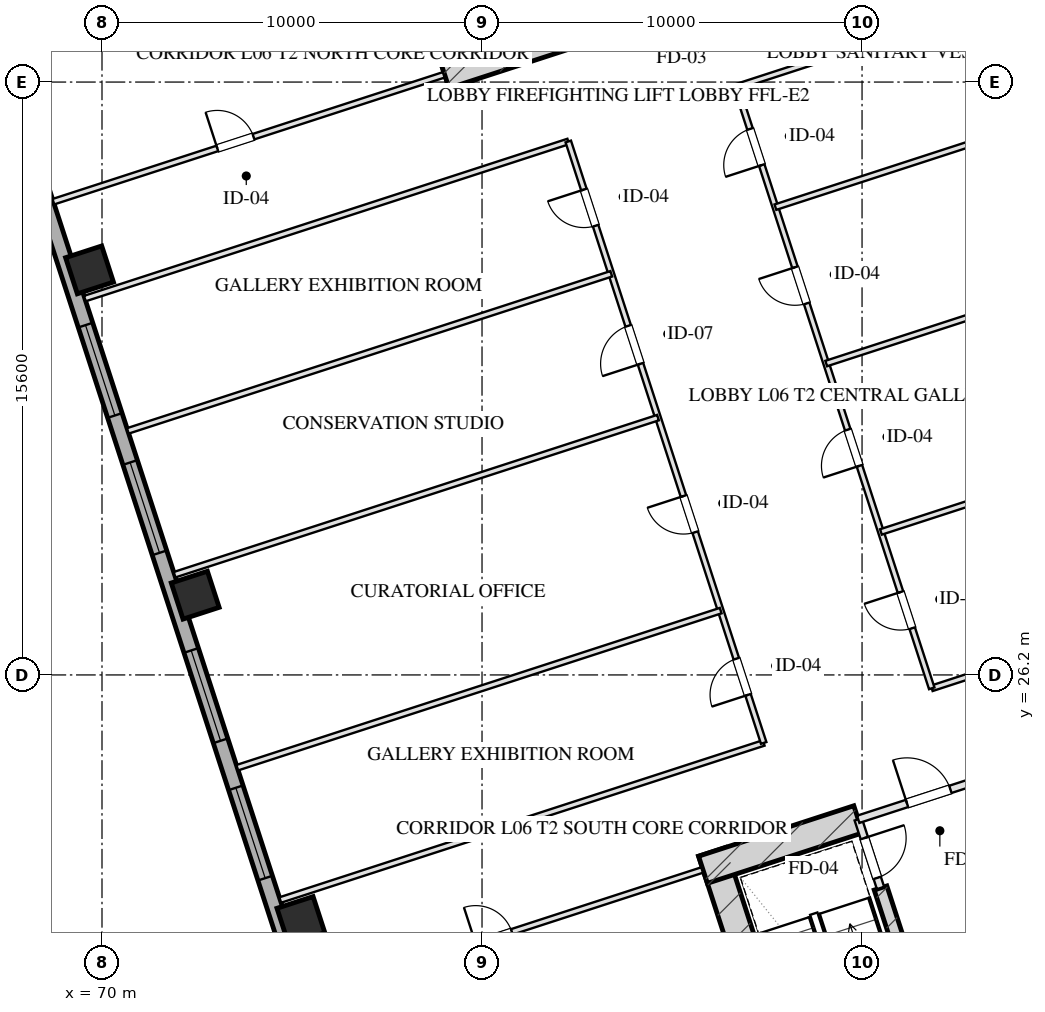
"""IFC4 building model, lengths in metres.
Left out: names, types, materials, properties, quantities, classifications, styles, units other than length and angle.
Written with IfcOpenShell. Run it as: python <this file> out.ifc"""

import sys

from ifc_helpers import new_model, si_unit, direction, frame, frame_2d, origin, origin_2d, place, context, subcontext, project, spatial, rectangle, hollow_rectangle, extrude, element, fill, save


model = new_model("IFC4")
c1 = context("Model", 3, precision=1e-05, world=origin(), true_north=direction((0.0, 1.0)))
c2 = subcontext(c1, "Body", "Model", "MODEL_VIEW")
j1 = project(units=[si_unit("LENGTHUNIT", "METRE"), si_unit("PLANEANGLEUNIT", "RADIAN")], contexts=[c1])
p1 = place(None, origin())
s1 = spatial("IfcSite", under=j1, at=p1, CompositionType="ELEMENT")
p2 = place(p1, origin())
s2 = spatial("IfcBuilding", under=s1, at=p2, CompositionType="ELEMENT")
p3 = place(p2, frame((0.0, 0.0, 30.0)))
s3 = spatial("IfcBuildingStorey", under=s2, at=p3, CompositionType="ELEMENT", Elevation=30.0)
p4 = place(p3, frame((86.055, 21.546, 0.0), z_axis=(0.0, 0.0, 1.0), x_axis=(0.309023585745, -0.951054374604, 0.0)))
e1 = element("IfcWall", 1, at=p4, inside=s3, PredefinedType="SHEAR", context=c2, shape_type="SweptSolid", body=[
    extrude(rectangle(XDim=9.63, YDim=0.75, at=frame_2d((4.815, 0.0))), origin(), (0.0, 0.0, 1.0), 4.0),
])
p5 = place(p3, frame((90.486, 20.594, 0.0), z_axis=(0.0, 0.0, 1.0), x_axis=(0.309020428229, -0.951055400562, 0.0)))
e2 = element("IfcWall", 2, at=p5, inside=s3, PredefinedType="SHEAR", context=c2, shape_type="SweptSolid", body=[
    extrude(rectangle(XDim=6.98, YDim=0.35, at=frame_2d((3.49, 0.0))), origin(), (0.0, 0.0, 1.0), 4.0),
])
p6 = place(p3, frame((85.814, 21.074, 0.0), z_axis=(0.0, 0.0, 1.0), x_axis=(0.95106580992, 0.308988390074, 0.0)))
e3 = element("IfcWall", 3, at=p6, inside=s3, PredefinedType="SHEAR", context=c2, shape_type="SweptSolid", body=[
    extrude(rectangle(XDim=4.295, YDim=0.75, at=frame_2d((2.147, 0.0))), origin(), (0.0, 0.0, 1.0), 4.0),
])
p7 = place(p3, frame((79.489, 41.756, 0.0), z_axis=(0.0, 0.0, 1.0), x_axis=(-0.309016134813, 0.951056795583, 0.0)))
e4 = element("IfcWall", 4, at=p7, inside=s3, PredefinedType="SHEAR", context=c2, shape_type="SweptSolid", body=[
    extrude(rectangle(XDim=9.63, YDim=0.75, at=frame_2d((4.815, 0.0))), origin(), (0.0, 0.0, 1.0), 4.0),
])
p8 = place(p3, frame((79.016, 41.997, 0.0), z_axis=(0.0, 0.0, 1.0), x_axis=(0.95106038264, 0.309005094736, 0.0)))
e5 = element("IfcWall", 5, at=p8, inside=s3, PredefinedType="SHEAR", context=c2, shape_type="SweptSolid", body=[
    extrude(rectangle(XDim=4.295, YDim=0.75, at=frame_2d((2.147, 0.0))), origin(), (0.0, 0.0, 1.0), 4.0),
])
for number, where, z_axis, x_axis in (
    (6, (75.234, 19.739, 0.0), (0.0, 0.0, 1.0), (0.951, 0.309, 0.0)),
    (7, (72.453, 28.299, 0.0), (0.0, 0.0, 1.0), (0.951, 0.309, 0.0)),
    (8, (69.672, 36.858, 0.0), (0.0, 0.0, 1.0), (0.951, 0.309, 0.0)),
):
    element("IfcColumn", number, at=place(p3, frame(where, z_axis=z_axis, x_axis=x_axis)), inside=s3, PredefinedType="COLUMN", context=c2, shape_type="SweptSolid", body=[
        extrude(hollow_rectangle(XDim=1.0, YDim=1.0, WallThickness=0.036, at=origin_2d()), origin(), (0.0, 0.0, 1.0), 4.001),
    ])
p9 = place(p3, frame((79.655, 4.352, 0.0), z_axis=(0.0, 0.0, 1.0), x_axis=(-0.309014526607, 0.951057318118, 0.0)))
e9 = element("IfcWall", 9, at=p9, inside=s3, PredefinedType="SOLIDWALL", context=c2, shape_type="SweptSolid", body=[
    extrude(rectangle(XDim=50.0, YDim=0.4, at=frame_2d((25.0, 0.0))), origin(), (0.0, 0.0, 1.0), 3.16),
])
p10 = place(p9, frame((17.35, 0.0, 0.75)))
e10 = element("IfcOpeningElement", 10, at=p10, cuts=e9, PredefinedType="OPENING", context=c2, shape_type="SweptSolid", body=[
    extrude(rectangle(XDim=2.5, YDim=1.75, at=frame_2d((1.25, 0.875))), frame((0.0, 0.21, 0.0), z_axis=(0.0, -1.0, 0.0), x_axis=(1.0, 0.0, 0.0)), (0.0, 0.0, 1.0), 0.42),
])
p11 = place(p9, frame((21.15, 0.0, 0.75)))
e11 = element("IfcOpeningElement", 11, at=p11, cuts=e9, PredefinedType="OPENING", context=c2, shape_type="SweptSolid", body=[
    extrude(rectangle(XDim=2.5, YDim=1.75, at=frame_2d((1.25, 0.875))), frame((0.0, 0.21, 0.0), z_axis=(0.0, -1.0, 0.0), x_axis=(1.0, 0.0, 0.0)), (0.0, 0.0, 1.0), 0.42),
])
p12 = place(p9, frame((26.35, 0.0, 0.75)))
e12 = element("IfcOpeningElement", 12, at=p12, cuts=e9, PredefinedType="OPENING", context=c2, shape_type="SweptSolid", body=[
    extrude(rectangle(XDim=2.5, YDim=1.75, at=frame_2d((1.25, 0.875))), frame((0.0, 0.21, 0.0), z_axis=(0.0, -1.0, 0.0), x_axis=(1.0, 0.0, 0.0)), (0.0, 0.0, 1.0), 0.42),
])
p13 = place(p9, frame((30.15, 0.0, 0.75)))
e13 = element("IfcOpeningElement", 13, at=p13, cuts=e9, PredefinedType="OPENING", context=c2, shape_type="SweptSolid", body=[
    extrude(rectangle(XDim=2.5, YDim=1.75, at=frame_2d((1.25, 0.875))), frame((0.0, 0.21, 0.0), z_axis=(0.0, -1.0, 0.0), x_axis=(1.0, 0.0, 0.0)), (0.0, 0.0, 1.0), 0.42),
])
p14 = place(p3, frame((89.899, 22.401, 0.0), z_axis=(0.0, 0.0, 1.0), x_axis=(0.308932062672, -0.951084108086, 0.0)))
e14 = element("IfcWall", 14, at=p14, inside=s3, PredefinedType="PARTITIONING", context=c2, shape_type="SweptSolid", body=[
    extrude(rectangle(XDim=1.9, YDim=0.2, at=frame_2d((0.95, 0.0))), origin(), (0.0, 0.0, 1.0), 3.725),
])
p15 = place(p14, frame((0.52, 0.0, 0.0)))
e15 = element("IfcOpeningElement", 15, at=p15, cuts=e14, PredefinedType="OPENING", context=c2, shape_type="SweptSolid", body=[
    extrude(rectangle(XDim=1.1, YDim=2.05, at=frame_2d((0.55, 1.025))), frame((0.0, 0.11, 0.0), z_axis=(0.0, -1.0, 0.0), x_axis=(1.0, 0.0, 0.0)), (0.0, 0.0, 1.0), 0.22),
])
p16 = place(p3, frame((89.899, 22.401, 0.0), z_axis=(0.0, 0.0, 1.0), x_axis=(0.951046716504, 0.309047153403, 0.0)))
e16 = element("IfcWall", 16, at=p16, inside=s3, PredefinedType="PARTITIONING", context=c2, shape_type="SweptSolid", body=[
    extrude(rectangle(XDim=3.83, YDim=0.2, at=frame_2d((1.915, 0.0))), origin(), (0.0, 0.0, 1.0), 3.725),
])
p17 = place(p16, frame((1.35, 0.0, 0.0)))
e17 = element("IfcOpeningElement", 17, at=p17, cuts=e16, PredefinedType="OPENING", context=c2, shape_type="SweptSolid", body=[
    extrude(rectangle(XDim=1.2, YDim=2.05, at=frame_2d((0.6, 1.025))), frame((0.0, 0.11, 0.0), z_axis=(0.0, -1.0, 0.0), x_axis=(1.0, 0.0, 0.0)), (0.0, 0.0, 1.0), 0.22),
])
p18 = place(p3, frame((75.519, 17.729, 0.0), z_axis=(0.0, 0.0, 1.0), x_axis=(0.951056658866, 0.309016555588, 0.0)))
e18 = element("IfcWall", 18, at=p18, inside=s3, PredefinedType="PARTITIONING", context=c2, shape_type="SweptSolid", body=[
    extrude(rectangle(XDim=10.8, YDim=0.15, at=frame_2d((5.4, 0.0))), origin(), (0.0, 0.0, 1.0), 3.725),
])
p19 = place(p18, frame((4.536, 0.0, 0.0)))
e19 = element("IfcOpeningElement", 19, at=p19, cuts=e18, PredefinedType="OPENING", context=c2, shape_type="SweptSolid", body=[
    extrude(rectangle(XDim=1.0, YDim=2.05, at=frame_2d((0.5, 1.025))), frame((0.0, 0.085, 0.0), z_axis=(0.0, -1.0, 0.0), x_axis=(1.0, 0.0, 0.0)), (0.0, 0.0, 1.0), 0.17),
])
p20 = place(p3, frame((68.721, 38.652, 0.0), z_axis=(0.0, 0.0, 1.0), x_axis=(0.951056658866, 0.309016555588, 0.0)))
e20 = element("IfcWall", 20, at=p20, inside=s3, PredefinedType="PARTITIONING", context=c2, shape_type="SweptSolid", body=[
    extrude(rectangle(XDim=10.8, YDim=0.15, at=frame_2d((5.4, 0.0))), origin(), (0.0, 0.0, 1.0), 3.725),
])
p21 = place(p20, frame((4.536, 0.0, 0.0)))
e21 = element("IfcOpeningElement", 21, at=p21, cuts=e20, PredefinedType="OPENING", context=c2, shape_type="SweptSolid", body=[
    extrude(rectangle(XDim=1.0, YDim=2.05, at=frame_2d((0.5, 1.025))), frame((0.0, 0.085, 0.0), z_axis=(0.0, -1.0, 0.0), x_axis=(1.0, 0.0, 0.0)), (0.0, 0.0, 1.0), 0.17),
])
p22 = place(p3, frame((74.691, 20.278, 0.0), z_axis=(0.0, 0.0, 1.0), x_axis=(0.951052712421, 0.309028701251, 0.0)))
e22 = element("IfcWall", 22, at=p22, inside=s3, PredefinedType="PARTITIONING", context=c2, shape_type="SweptSolid", body=[
    extrude(rectangle(XDim=13.375, YDim=0.15, at=frame_2d((6.688, 0.0))), origin(), (0.0, 0.0, 1.0), 3.725),
])
p23 = place(p3, frame((91.834, 25.848, 0.0), z_axis=(0.0, 0.0, 1.0), x_axis=(0.951055605195, 0.309019798438, 0.0)))
e23 = element("IfcWall", 23, at=p23, inside=s3, PredefinedType="PARTITIONING", context=c2, shape_type="SweptSolid", body=[
    extrude(rectangle(XDim=19.575, YDim=0.15, at=frame_2d((9.788, 0.0))), origin(), (0.0, 0.0, 1.0), 3.725),
])
p24 = place(p3, frame((69.549, 36.103, 0.0), z_axis=(0.0, 0.0, 1.0), x_axis=(0.951058077006, 0.309012190961, 0.0)))
e24 = element("IfcWall", 24, at=p24, inside=s3, PredefinedType="PARTITIONING", context=c2, shape_type="SweptSolid", body=[
    extrude(rectangle(XDim=13.375, YDim=0.15, at=frame_2d((6.688, 0.0))), origin(), (0.0, 0.0, 1.0), 3.725),
])
p25 = place(p3, frame((86.692, 41.673, 0.0), z_axis=(0.0, 0.0, 1.0), x_axis=(0.951055605195, 0.309019798438, 0.0)))
e25 = element("IfcWall", 25, at=p25, inside=s3, PredefinedType="PARTITIONING", context=c2, shape_type="SweptSolid", body=[
    extrude(rectangle(XDim=19.575, YDim=0.15, at=frame_2d((9.788, 0.0))), origin(), (0.0, 0.0, 1.0), 3.725),
])
p26 = place(p3, frame((87.412, 24.411, 0.0), z_axis=(0.0, 0.0, 1.0), x_axis=(-0.309022042254, 0.951054876125, 0.0)))
e26 = element("IfcWall", 26, at=p26, inside=s3, PredefinedType="PARTITIONING", context=c2, shape_type="SweptSolid", body=[
    extrude(rectangle(XDim=16.64, YDim=0.15, at=frame_2d((8.32, 0.0))), origin(), (0.0, 0.0, 1.0), 3.725),
])
p27 = place(p26, frame((1.33, 0.0, 0.0)))
e27 = element("IfcOpeningElement", 27, at=p27, cuts=e26, PredefinedType="OPENING", context=c2, shape_type="SweptSolid", body=[
    extrude(rectangle(XDim=1.0, YDim=2.05, at=frame_2d((0.5, 1.025))), frame((0.0, 0.085, 0.0), z_axis=(0.0, -1.0, 0.0), x_axis=(1.0, 0.0, 0.0)), (0.0, 0.0, 1.0), 0.17),
])
p28 = place(p26, frame((5.83, 0.0, 0.0)))
e28 = element("IfcOpeningElement", 28, at=p28, cuts=e26, PredefinedType="OPENING", context=c2, shape_type="SweptSolid", body=[
    extrude(rectangle(XDim=1.0, YDim=2.05, at=frame_2d((0.5, 1.025))), frame((0.0, 0.085, 0.0), z_axis=(0.0, -1.0, 0.0), x_axis=(1.0, 0.0, 0.0)), (0.0, 0.0, 1.0), 0.17),
])
p29 = place(p26, frame((10.49, 0.0, 0.0)))
e29 = element("IfcOpeningElement", 29, at=p29, cuts=e26, PredefinedType="OPENING", context=c2, shape_type="SweptSolid", body=[
    extrude(rectangle(XDim=1.05, YDim=2.05, at=frame_2d((0.525, 1.025))), frame((0.0, 0.085, 0.0), z_axis=(0.0, -1.0, 0.0), x_axis=(1.0, 0.0, 0.0)), (0.0, 0.0, 1.0), 0.17),
])
p30 = place(p26, frame((14.31, 0.0, 0.0)))
e30 = element("IfcOpeningElement", 30, at=p30, cuts=e26, PredefinedType="OPENING", context=c2, shape_type="SweptSolid", body=[
    extrude(rectangle(XDim=1.0, YDim=2.05, at=frame_2d((0.5, 1.025))), frame((0.0, 0.085, 0.0), z_axis=(0.0, -1.0, 0.0), x_axis=(1.0, 0.0, 0.0)), (0.0, 0.0, 1.0), 0.17),
])
p31 = place(p3, frame((91.834, 25.848, 0.0), z_axis=(0.0, 0.0, 1.0), x_axis=(-0.30901773025, 0.951056277195, 0.0)))
e31 = element("IfcWall", 31, at=p31, inside=s3, PredefinedType="PARTITIONING", context=c2, shape_type="SweptSolid", body=[
    extrude(rectangle(XDim=16.64, YDim=0.15, at=frame_2d((8.32, 0.0))), origin(), (0.0, 0.0, 1.0), 3.725),
])
p32 = place(p31, frame((1.663, 0.0, 0.0)))
e32 = element("IfcOpeningElement", 32, at=p32, cuts=e31, PredefinedType="OPENING", context=c2, shape_type="SweptSolid", body=[
    extrude(rectangle(XDim=1.0, YDim=2.05, at=frame_2d((0.5, 1.025))), frame((0.0, 0.085, 0.0), z_axis=(0.0, -1.0, 0.0), x_axis=(1.0, 0.0, 0.0)), (0.0, 0.0, 1.0), 0.17),
])
p33 = place(p31, frame((6.156, 0.0, 0.0)))
e33 = element("IfcOpeningElement", 33, at=p33, cuts=e31, PredefinedType="OPENING", context=c2, shape_type="SweptSolid", body=[
    extrude(rectangle(XDim=1.0, YDim=2.05, at=frame_2d((0.5, 1.025))), frame((0.0, 0.085, 0.0), z_axis=(0.0, -1.0, 0.0), x_axis=(1.0, 0.0, 0.0)), (0.0, 0.0, 1.0), 0.17),
])
p34 = place(p31, frame((10.649, 0.0, 0.0)))
e34 = element("IfcOpeningElement", 34, at=p34, cuts=e31, PredefinedType="OPENING", context=c2, shape_type="SweptSolid", body=[
    extrude(rectangle(XDim=1.0, YDim=2.05, at=frame_2d((0.5, 1.025))), frame((0.0, 0.085, 0.0), z_axis=(0.0, -1.0, 0.0), x_axis=(1.0, 0.0, 0.0)), (0.0, 0.0, 1.0), 0.17),
])
p35 = place(p31, frame((14.476, 0.0, 0.0)))
e35 = element("IfcOpeningElement", 35, at=p35, cuts=e31, PredefinedType="OPENING", context=c2, shape_type="SweptSolid", body=[
    extrude(rectangle(XDim=1.0, YDim=2.05, at=frame_2d((0.5, 1.025))), frame((0.0, 0.085, 0.0), z_axis=(0.0, -1.0, 0.0), x_axis=(1.0, 0.0, 0.0)), (0.0, 0.0, 1.0), 0.17),
])
for number, where, z_axis, x_axis in (
    (36, (73.56, 23.759, 0.0), (0.0, 0.0, 1.0), (0.951, 0.309, 0.0)),
    (37, (71.91, 28.837, 0.0), (0.0, 0.0, 1.0), (0.951, 0.309, 0.0)),
):
    element("IfcWall", number, at=place(p3, frame(where, z_axis=z_axis, x_axis=x_axis)), inside=s3, PredefinedType="PARTITIONING", context=c2, shape_type="SweptSolid", body=[
        extrude(rectangle(XDim=13.375, YDim=0.15, at=frame_2d((6.688, 0.0))), origin(), (0.0, 0.0, 1.0), 3.725),
    ])
p36 = place(p3, frame((70.68, 32.622, 0.0), z_axis=(0.0, 0.0, 1.0), x_axis=(0.951056333968, 0.309017555521, 0.0)))
e38 = element("IfcWall", 38, at=p36, inside=s3, PredefinedType="PARTITIONING", context=c2, shape_type="SweptSolid", body=[
    extrude(rectangle(XDim=13.375, YDim=0.15, at=frame_2d((6.688, 0.0))), origin(), (0.0, 0.0, 1.0), 3.725),
])
for number, where, z_axis, x_axis in (
    (39, (90.497, 29.962, 0.0), (0.0, 0.0, 1.0), (0.951, 0.309, 0.0)),
    (40, (89.057, 34.394, 0.0), (0.0, 0.0, 1.0), (0.951, 0.309, 0.0)),
    (41, (87.72, 38.508, 0.0), (0.0, 0.0, 1.0), (0.951, 0.309, 0.0)),
):
    element("IfcWall", number, at=place(p3, frame(where, z_axis=z_axis, x_axis=x_axis)), inside=s3, PredefinedType="PARTITIONING", context=c2, shape_type="SweptSolid", body=[
        extrude(rectangle(XDim=19.575, YDim=0.15, at=frame_2d((9.788, 0.0))), origin(), (0.0, 0.0, 1.0), 3.725),
    ])
p37 = place(p10, origin())
e42 = element("IfcWindow", 42, at=p37, inside=s3, PartitioningType="TRIPLE_PANEL_VERTICAL", PredefinedType="WINDOW", context=c2, shape_type="SweptSolid", body=[
    extrude(rectangle(XDim=2.5, YDim=1.75, at=frame_2d((1.25, 0.875))), frame((0.0, 0.03, 0.0), z_axis=(0.0, -1.0, 0.0), x_axis=(1.0, 0.0, 0.0)), (0.0, 0.0, 1.0), 0.06),
])
fill(e10, e42)
p38 = place(p11, origin())
e43 = element("IfcWindow", 43, at=p38, inside=s3, PartitioningType="TRIPLE_PANEL_VERTICAL", PredefinedType="WINDOW", context=c2, shape_type="SweptSolid", body=[
    extrude(rectangle(XDim=2.5, YDim=1.75, at=frame_2d((1.25, 0.875))), frame((0.0, 0.03, 0.0), z_axis=(0.0, -1.0, 0.0), x_axis=(1.0, 0.0, 0.0)), (0.0, 0.0, 1.0), 0.06),
])
fill(e11, e43)
p39 = place(p12, origin())
e44 = element("IfcWindow", 44, at=p39, inside=s3, PartitioningType="TRIPLE_PANEL_VERTICAL", PredefinedType="WINDOW", context=c2, shape_type="SweptSolid", body=[
    extrude(rectangle(XDim=2.5, YDim=1.75, at=frame_2d((1.25, 0.875))), frame((0.0, 0.03, 0.0), z_axis=(0.0, -1.0, 0.0), x_axis=(1.0, 0.0, 0.0)), (0.0, 0.0, 1.0), 0.06),
])
fill(e12, e44)
p40 = place(p13, origin())
e45 = element("IfcWindow", 45, at=p40, inside=s3, PartitioningType="TRIPLE_PANEL_VERTICAL", PredefinedType="WINDOW", context=c2, shape_type="SweptSolid", body=[
    extrude(rectangle(XDim=2.5, YDim=1.75, at=frame_2d((1.25, 0.875))), frame((0.0, 0.03, 0.0), z_axis=(0.0, -1.0, 0.0), x_axis=(1.0, 0.0, 0.0)), (0.0, 0.0, 1.0), 0.06),
])
fill(e13, e45)
p41 = place(p15, origin())
e46 = element("IfcDoor", 46, at=p41, inside=s3, OperationType="SINGLE_SWING_LEFT", PredefinedType="DOOR", context=c2, shape_type="SweptSolid", body=[
    extrude(rectangle(XDim=1.1, YDim=2.05, at=frame_2d((0.55, 1.025))), frame((0.0, 0.025, 0.0), z_axis=(0.0, -1.0, 0.0), x_axis=(1.0, 0.0, 0.0)), (0.0, 0.0, 1.0), 0.05),
])
fill(e15, e46)
p42 = place(p17, origin())
e47 = element("IfcDoor", 47, at=p42, inside=s3, OperationType="SINGLE_SWING_LEFT", PredefinedType="DOOR", context=c2, shape_type="SweptSolid", body=[
    extrude(rectangle(XDim=1.2, YDim=2.05, at=frame_2d((0.6, 1.025))), frame((0.0, 0.025, 0.0), z_axis=(0.0, -1.0, 0.0), x_axis=(1.0, 0.0, 0.0)), (0.0, 0.0, 1.0), 0.05),
])
fill(e17, e47)
p43 = place(p19, origin())
e48 = element("IfcDoor", 48, at=p43, inside=s3, OperationType="SINGLE_SWING_LEFT", PredefinedType="DOOR", context=c2, shape_type="SweptSolid", body=[
    extrude(rectangle(XDim=1.0, YDim=2.05, at=frame_2d((0.5, 1.025))), frame((0.0, 0.025, 0.0), z_axis=(0.0, -1.0, 0.0), x_axis=(1.0, 0.0, 0.0)), (0.0, 0.0, 1.0), 0.05),
])
fill(e19, e48)
p44 = place(p21, origin())
e49 = element("IfcDoor", 49, at=p44, inside=s3, OperationType="SINGLE_SWING_LEFT", PredefinedType="DOOR", context=c2, shape_type="SweptSolid", body=[
    extrude(rectangle(XDim=1.0, YDim=2.05, at=frame_2d((0.5, 1.025))), frame((0.0, 0.025, 0.0), z_axis=(0.0, -1.0, 0.0), x_axis=(1.0, 0.0, 0.0)), (0.0, 0.0, 1.0), 0.05),
])
fill(e21, e49)
p45 = place(p27, origin())
e50 = element("IfcDoor", 50, at=p45, inside=s3, OperationType="SINGLE_SWING_LEFT", PredefinedType="DOOR", context=c2, shape_type="SweptSolid", body=[
    extrude(rectangle(XDim=1.0, YDim=2.05, at=frame_2d((0.5, 1.025))), frame((0.0, 0.025, 0.0), z_axis=(0.0, -1.0, 0.0), x_axis=(1.0, 0.0, 0.0)), (0.0, 0.0, 1.0), 0.05),
])
fill(e27, e50)
p46 = place(p28, origin())
e51 = element("IfcDoor", 51, at=p46, inside=s3, OperationType="SINGLE_SWING_RIGHT", PredefinedType="DOOR", context=c2, shape_type="SweptSolid", body=[
    extrude(rectangle(XDim=1.0, YDim=2.05, at=frame_2d((0.5, 1.025))), frame((0.0, 0.025, 0.0), z_axis=(0.0, -1.0, 0.0), x_axis=(1.0, 0.0, 0.0)), (0.0, 0.0, 1.0), 0.05),
])
fill(e28, e51)
p47 = place(p29, origin())
e52 = element("IfcDoor", 52, at=p47, inside=s3, OperationType="SINGLE_SWING_LEFT", PredefinedType="DOOR", context=c2, shape_type="SweptSolid", body=[
    extrude(rectangle(XDim=1.05, YDim=2.05, at=frame_2d((0.525, 1.025))), frame((0.0, 0.025, 0.0), z_axis=(0.0, -1.0, 0.0), x_axis=(1.0, 0.0, 0.0)), (0.0, 0.0, 1.0), 0.05),
])
fill(e29, e52)
p48 = place(p30, origin())
e53 = element("IfcDoor", 53, at=p48, inside=s3, OperationType="SINGLE_SWING_RIGHT", PredefinedType="DOOR", context=c2, shape_type="SweptSolid", body=[
    extrude(rectangle(XDim=1.0, YDim=2.05, at=frame_2d((0.5, 1.025))), frame((0.0, 0.025, 0.0), z_axis=(0.0, -1.0, 0.0), x_axis=(1.0, 0.0, 0.0)), (0.0, 0.0, 1.0), 0.05),
])
fill(e30, e53)
p49 = place(p32, origin())
e54 = element("IfcDoor", 54, at=p49, inside=s3, OperationType="SINGLE_SWING_RIGHT", PredefinedType="DOOR", context=c2, shape_type="SweptSolid", body=[
    extrude(rectangle(XDim=1.0, YDim=2.05, at=frame_2d((0.5, 1.025))), frame((0.0, 0.025, 0.0), z_axis=(0.0, -1.0, 0.0), x_axis=(1.0, 0.0, 0.0)), (0.0, 0.0, 1.0), 0.05),
])
fill(e32, e54)
p50 = place(p33, origin())
e55 = element("IfcDoor", 55, at=p50, inside=s3, OperationType="SINGLE_SWING_LEFT", PredefinedType="DOOR", context=c2, shape_type="SweptSolid", body=[
    extrude(rectangle(XDim=1.0, YDim=2.05, at=frame_2d((0.5, 1.025))), frame((0.0, 0.025, 0.0), z_axis=(0.0, -1.0, 0.0), x_axis=(1.0, 0.0, 0.0)), (0.0, 0.0, 1.0), 0.05),
])
fill(e33, e55)
p51 = place(p34, origin())
e56 = element("IfcDoor", 56, at=p51, inside=s3, OperationType="SINGLE_SWING_RIGHT", PredefinedType="DOOR", context=c2, shape_type="SweptSolid", body=[
    extrude(rectangle(XDim=1.0, YDim=2.05, at=frame_2d((0.5, 1.025))), frame((0.0, 0.025, 0.0), z_axis=(0.0, -1.0, 0.0), x_axis=(1.0, 0.0, 0.0)), (0.0, 0.0, 1.0), 0.05),
])
fill(e34, e56)
p52 = place(p35, origin())
e57 = element("IfcDoor", 57, at=p52, inside=s3, OperationType="SINGLE_SWING_LEFT", PredefinedType="DOOR", context=c2, shape_type="SweptSolid", body=[
    extrude(rectangle(XDim=1.0, YDim=2.05, at=frame_2d((0.5, 1.025))), frame((0.0, 0.025, 0.0), z_axis=(0.0, -1.0, 0.0), x_axis=(1.0, 0.0, 0.0)), (0.0, 0.0, 1.0), 0.05),
])
fill(e35, e57)
save(model, sys.argv[1])
